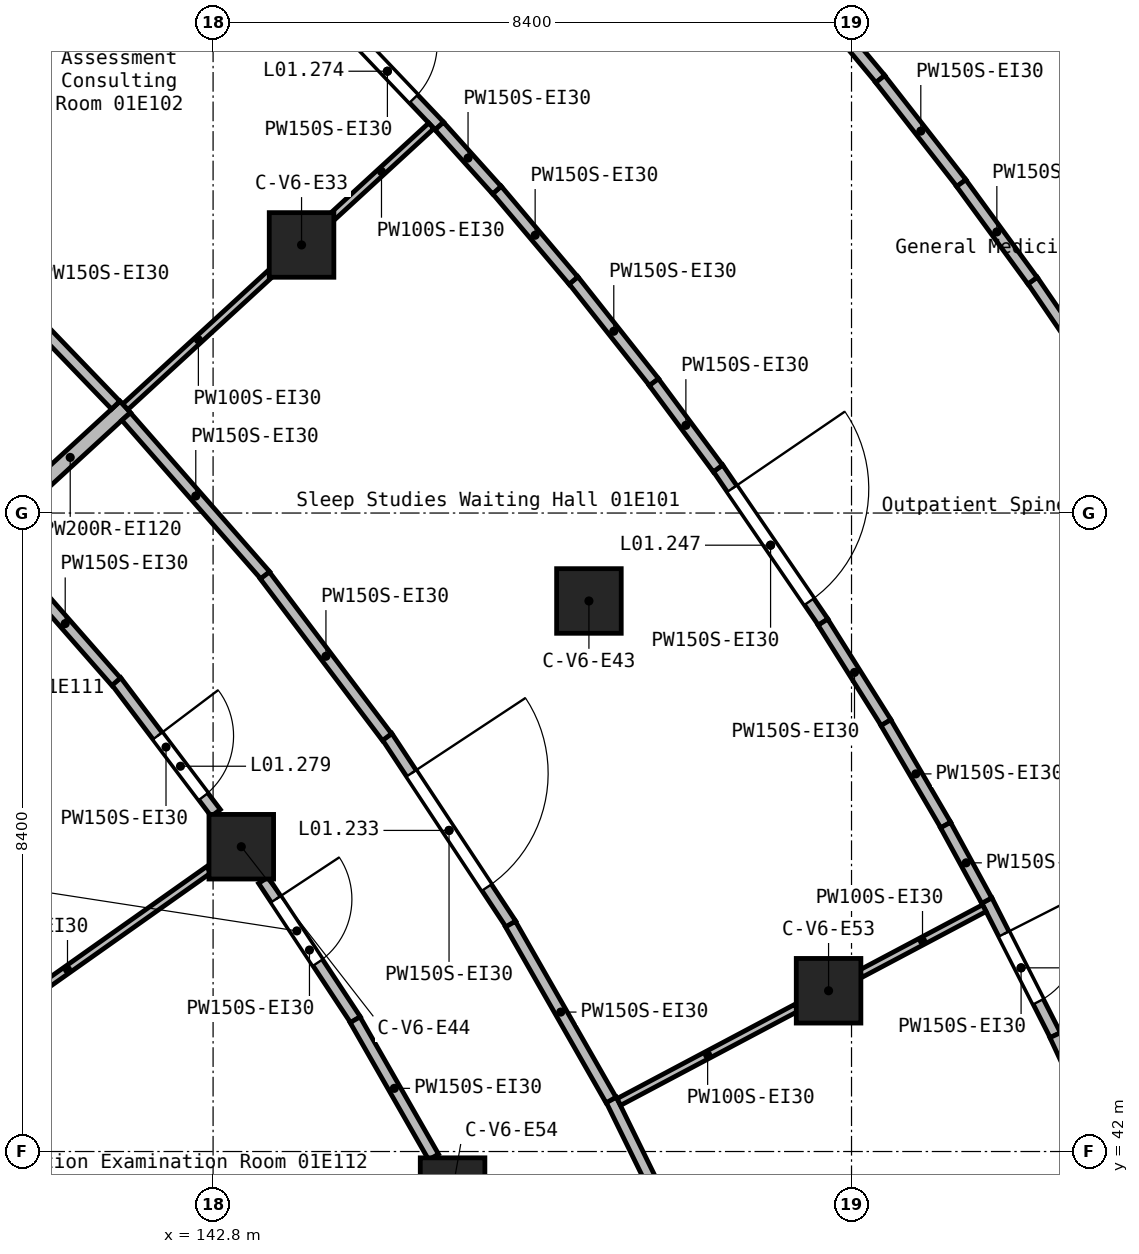
"""IFC4 building model, lengths in metres.
Left out: names, types, materials, properties, quantities, classifications, styles, units other than length and angle.
Written with IfcOpenShell. Run it as: python <this file> out.ifc"""

import sys

from ifc_helpers import new_model, si_unit, direction, frame, frame_2d, origin, origin_2d, place, context, subcontext, project, spatial, rectangle, extrude, element, fill, save


model = new_model("IFC4")
c1 = context("Model", 3, precision=1e-05, world=origin(), true_north=direction((0.0, 1.0)))
c2 = subcontext(c1, "Body", "Model", "MODEL_VIEW")
j1 = project(units=[si_unit("LENGTHUNIT", "METRE"), si_unit("PLANEANGLEUNIT", "RADIAN")], contexts=[c1])
p1 = place(None, origin())
s1 = spatial("IfcSite", under=j1, at=p1, CompositionType="ELEMENT")
p2 = place(p1, origin())
s2 = spatial("IfcBuilding", under=s1, at=p2, CompositionType="ELEMENT")
p3 = place(p2, frame((0.0, 0.0, 5.4)))
s3 = spatial("IfcBuildingStorey", under=s2, at=p3, CompositionType="ELEMENT", Elevation=5.4)
for number, where, z_axis, x_axis in (
    (1, (143.171, 46.01, 0.0), (0.0, 0.0, 1.0), (1.0, 0.0, 0.0)),
    (2, (143.964, 53.927, 0.0), (0.0, 0.0, 1.0), (1.0, 0.0, 0.0)),
    (3, (145.951, 41.492, 0.0), (0.0, 0.0, 1.0), (1.0, 0.0, 0.0)),
    (4, (147.745, 49.243, 0.0), (0.0, 0.0, 1.0), (1.0, 0.0, 0.0)),
    (5, (150.898, 44.115, 0.0), (0.0, 0.0, 1.0), (1.0, 0.0, 0.0)),
):
    element("IfcColumn", number, at=place(p3, frame(where, z_axis=z_axis, x_axis=x_axis)), inside=s3, PredefinedType="COLUMN", context=c2, shape_type="SweptSolid", body=[
        extrude(rectangle(XDim=0.85, YDim=0.85, at=origin_2d()), origin(), (0.0, 0.0, 1.0), 4.5),
    ])
p4 = place(p3, frame((140.196, 50.467, 0.0), z_axis=(0.0, 0.0, 1.0), x_axis=(0.736519787736, 0.676415997943, 0.0)))
e6 = element("IfcWall", 6, at=p4, inside=s3, PredefinedType="SOLIDWALL", context=c2, shape_type="SweptSolid", body=[
    extrude(rectangle(XDim=1.966, YDim=0.2, at=frame_2d((0.983, 0.0))), origin(), (0.0, 0.0, 1.0), 4.15),
])
p5 = place(p3, frame((148.038, 42.683, 0.0), z_axis=(0.0, 0.0, 1.0), x_axis=(0.440200278942, -0.897899612663, 0.0)))
e7 = element("IfcWall", 7, at=p5, inside=s3, PredefinedType="PARTITIONING", context=c2, shape_type="SweptSolid", body=[
    extrude(rectangle(XDim=2.958, YDim=0.15, at=frame_2d((1.479, 0.0))), origin(), (0.0, 0.0, 1.0), 4.15),
])
p6 = place(p3, frame((145.09, 47.458, 0.0), z_axis=(0.0, 0.0, 1.0), x_axis=(0.551018151494, -0.834493257447, 0.0)))
e8 = element("IfcWall", 8, at=p6, inside=s3, PredefinedType="PARTITIONING", context=c2, shape_type="SweptSolid", body=[
    extrude(rectangle(XDim=2.958, YDim=0.15, at=frame_2d((1.479, 0.0))), origin(), (0.0, 0.0, 1.0), 4.15),
])
p7 = place(p6, frame((0.579, 0.0, 0.0)))
e9 = element("IfcOpeningElement", 9, at=p7, cuts=e8, PredefinedType="OPENING", context=c2, shape_type="SweptSolid", body=[
    extrude(rectangle(XDim=1.8, YDim=2.1, at=frame_2d((0.9, 1.05))), frame((0.0, 0.085, 0.0), z_axis=(0.0, -1.0, 0.0), x_axis=(1.0, 0.0, 0.0)), (0.0, 0.0, 1.0), 0.17),
])
p8 = place(p3, frame((146.713, 44.992, 0.0), z_axis=(0.0, 0.0, 1.0), x_axis=(0.49622768999, -0.868192420888, 0.0)))
e10 = element("IfcWall", 10, at=p8, inside=s3, PredefinedType="PARTITIONING", context=c2, shape_type="SweptSolid", body=[
    extrude(rectangle(XDim=2.666, YDim=0.15, at=frame_2d((1.333, 0.0))), origin(), (0.0, 0.0, 1.0), 4.15),
])
p9 = place(p3, frame((141.656, 51.669, 0.0), z_axis=(0.0, 0.0, 1.0), x_axis=(0.659076402407, -0.752075990702, 0.0)))
e11 = element("IfcWall", 11, at=p9, inside=s3, PredefinedType="PARTITIONING", context=c2, shape_type="SweptSolid", body=[
    extrude(rectangle(XDim=2.78, YDim=0.15, at=frame_2d((1.39, 0.0))), origin(), (0.0, 0.0, 1.0), 4.15),
])
p10 = place(p3, frame((143.481, 49.579, 0.0), z_axis=(0.0, 0.0, 1.0), x_axis=(0.602824021104, -0.797874175281, 0.0)))
e12 = element("IfcWall", 12, at=p10, inside=s3, PredefinedType="PARTITIONING", context=c2, shape_type="SweptSolid", body=[
    extrude(rectangle(XDim=2.666, YDim=0.15, at=frame_2d((1.333, 0.0))), origin(), (0.0, 0.0, 1.0), 4.15),
])
p11 = place(p3, frame((139.691, 53.718, 0.0), z_axis=(0.0, 0.0, 1.0), x_axis=(0.693447550136, -0.720507109757, 0.0)))
e13 = element("IfcWall", 13, at=p11, inside=s3, PredefinedType="PARTITIONING", context=c2, shape_type="SweptSolid", body=[
    extrude(rectangle(XDim=2.635, YDim=0.15, at=frame_2d((1.317, 0.0))), origin(), (0.0, 0.0, 1.0), 4.15),
])
p12 = place(p3, frame((141.526, 48.188, 0.0), z_axis=(0.0, 0.0, 1.0), x_axis=(0.60280129331, -0.797891346477, 0.0)))
e14 = element("IfcWall", 14, at=p12, inside=s3, PredefinedType="PARTITIONING", context=c2, shape_type="SweptSolid", body=[
    extrude(rectangle(XDim=2.172, YDim=0.15, at=frame_2d((1.086, 0.0))), origin(), (0.0, 0.0, 1.0), 4.15),
])
p13 = place(p12, frame((0.902, 0.0, 0.0)))
e15 = element("IfcOpeningElement", 15, at=p13, cuts=e14, PredefinedType="OPENING", context=c2, shape_type="SweptSolid", body=[
    extrude(rectangle(XDim=1.0, YDim=2.1, at=frame_2d((0.5, 1.05))), frame((0.0, 0.085, 0.0), z_axis=(0.0, -1.0, 0.0), x_axis=(1.0, 0.0, 0.0)), (0.0, 0.0, 1.0), 0.17),
])
p14 = place(p3, frame((143.462, 45.57, 0.0), z_axis=(0.0, 0.0, 1.0), x_axis=(0.550880835548, -0.834583911315, 0.0)))
e16 = element("IfcWall", 16, at=p14, inside=s3, PredefinedType="PARTITIONING", context=c2, shape_type="SweptSolid", body=[
    extrude(rectangle(XDim=2.201, YDim=0.15, at=frame_2d((1.101, 0.0))), origin(), (0.0, 0.0, 1.0), 4.15),
])
p15 = place(p14, frame((0.299, 0.0, 0.0)))
e17 = element("IfcOpeningElement", 17, at=p15, cuts=e16, PredefinedType="OPENING", context=c2, shape_type="SweptSolid", body=[
    extrude(rectangle(XDim=1.0, YDim=2.1, at=frame_2d((0.5, 1.05))), frame((0.0, 0.085, 0.0), z_axis=(0.0, -1.0, 0.0), x_axis=(1.0, 0.0, 0.0)), (0.0, 0.0, 1.0), 0.17),
])
p16 = place(p3, frame((144.668, 43.734, 0.0), z_axis=(0.0, 0.0, 1.0), x_axis=(0.496694973164, -0.867925171679, 0.0)))
e18 = element("IfcWall", 18, at=p16, inside=s3, PredefinedType="PARTITIONING", context=c2, shape_type="SweptSolid", body=[
    extrude(rectangle(XDim=2.08, YDim=0.15, at=frame_2d((1.04, 0.0))), origin(), (0.0, 0.0, 1.0), 4.15),
])
p17 = place(p3, frame((140.184, 49.71, 0.0), z_axis=(0.0, 0.0, 1.0), x_axis=(0.659209376091, -0.751959439381, 0.0)))
e19 = element("IfcWall", 19, at=p17, inside=s3, PredefinedType="PARTITIONING", context=c2, shape_type="SweptSolid", body=[
    extrude(rectangle(XDim=2.035, YDim=0.15, at=frame_2d((1.017, 0.0))), origin(), (0.0, 0.0, 1.0), 4.15),
])
p18 = place(p3, frame((149.443, 50.99, 0.0), z_axis=(0.0, 0.0, 1.0), x_axis=(0.564305795339, -0.825565847977, 0.0)))
e20 = element("IfcWall", 20, at=p18, inside=s3, PredefinedType="PARTITIONING", context=c2, shape_type="SweptSolid", body=[
    extrude(rectangle(XDim=2.454, YDim=0.15, at=frame_2d((1.227, 0.0))), origin(), (0.0, 0.0, 1.0), 4.15),
])
p19 = place(p18, frame((0.327, 0.0, 0.0)))
e21 = element("IfcOpeningElement", 21, at=p19, cuts=e20, PredefinedType="OPENING", context=c2, shape_type="SweptSolid", body=[
    extrude(rectangle(XDim=1.8, YDim=2.1, at=frame_2d((0.9, 1.05))), frame((0.0, 0.085, 0.0), z_axis=(0.0, -1.0, 0.0), x_axis=(1.0, 0.0, 0.0)), (0.0, 0.0, 1.0), 0.17),
])
p20 = place(p3, frame((152.98, 45.304, 0.0), z_axis=(0.0, 0.0, 1.0), x_axis=(0.45308978769, -0.89146488674, 0.0)))
e22 = element("IfcWall", 22, at=p20, inside=s3, PredefinedType="PARTITIONING", context=c2, shape_type="SweptSolid", body=[
    extrude(rectangle(XDim=1.991, YDim=0.15, at=frame_2d((0.996, 0.0))), origin(), (0.0, 0.0, 1.0), 4.15),
])
p21 = place(p20, frame((0.495, 0.0, 0.0)))
e23 = element("IfcOpeningElement", 23, at=p21, cuts=e22, PredefinedType="OPENING", context=c2, shape_type="SweptSolid", body=[
    extrude(rectangle(XDim=1.0, YDim=2.1, at=frame_2d((0.5, 1.05))), frame((0.0, 0.085, 0.0), z_axis=(0.0, -1.0, 0.0), x_axis=(1.0, 0.0, 0.0)), (0.0, 0.0, 1.0), 0.17),
])
p22 = place(p3, frame((144.408, 56.933, 0.0), z_axis=(0.0, 0.0, 1.0), x_axis=(0.689023586461, -0.724738916646, 0.0)))
e24 = element("IfcWall", 24, at=p22, inside=s3, PredefinedType="PARTITIONING", context=c2, shape_type="SweptSolid", body=[
    extrude(rectangle(XDim=1.989, YDim=0.15, at=frame_2d((0.995, 0.0))), origin(), (0.0, 0.0, 1.0), 4.15),
])
p23 = place(p22, frame((0.494, 0.0, 0.0)))
e25 = element("IfcOpeningElement", 25, at=p23, cuts=e24, PredefinedType="OPENING", context=c2, shape_type="SweptSolid", body=[
    extrude(rectangle(XDim=1.0, YDim=2.1, at=frame_2d((0.5, 1.05))), frame((0.0, 0.085, 0.0), z_axis=(0.0, -1.0, 0.0), x_axis=(1.0, 0.0, 0.0)), (0.0, 0.0, 1.0), 0.17),
])
p24 = place(p3, frame((150.372, 57.558, 0.0), z_axis=(0.0, 0.0, 1.0), x_axis=(0.640540861144, -0.767924088178, 0.0)))
e26 = element("IfcWall", 26, at=p24, inside=s3, PredefinedType="PARTITIONING", context=c2, shape_type="SweptSolid", body=[
    extrude(rectangle(XDim=1.886, YDim=0.15, at=frame_2d((0.943, 0.0))), origin(), (0.0, 0.0, 1.0), 4.15),
])
p25 = place(p3, frame((151.577, 56.11, 0.0), z_axis=(0.0, 0.0, 1.0), x_axis=(0.615485903982, -0.788147893481, 0.0)))
e27 = element("IfcWall", 27, at=p25, inside=s3, PredefinedType="PARTITIONING", context=c2, shape_type="SweptSolid", body=[
    extrude(rectangle(XDim=1.738, YDim=0.15, at=frame_2d((0.869, 0.0))), origin(), (0.0, 0.0, 1.0), 4.15),
])
p26 = place(p3, frame((153.582, 53.46, 0.0), z_axis=(0.0, 0.0, 1.0), x_axis=(0.564047793024, -0.825742143277, 0.0)))
e28 = element("IfcWall", 28, at=p26, inside=s3, PredefinedType="PARTITIONING", context=c2, shape_type="SweptSolid", body=[
    extrude(rectangle(XDim=1.885, YDim=0.15, at=frame_2d((0.943, 0.0))), origin(), (0.0, 0.0, 1.0), 4.15),
])
p27 = place(p3, frame((152.643, 54.74, 0.0), z_axis=(0.0, 0.0, 1.0), x_axis=(0.590151339463, -0.807292633764, 0.0)))
e29 = element("IfcWall", 29, at=p27, inside=s3, PredefinedType="PARTITIONING", context=c2, shape_type="SweptSolid", body=[
    extrude(rectangle(XDim=1.59, YDim=0.15, at=frame_2d((0.795, 0.0))), origin(), (0.0, 0.0, 1.0), 4.15),
])
p28 = place(p3, frame((150.823, 48.965, 0.0), z_axis=(0.0, 0.0, 1.0), x_axis=(0.531963557529, -0.846767248694, 0.0)))
e30 = element("IfcWall", 30, at=p28, inside=s3, PredefinedType="PARTITIONING", context=c2, shape_type="SweptSolid", body=[
    extrude(rectangle(XDim=1.563, YDim=0.15, at=frame_2d((0.781, 0.0))), origin(), (0.0, 0.0, 1.0), 4.15),
])
p29 = place(p3, frame((147.542, 53.462, 0.0), z_axis=(0.0, 0.0, 1.0), x_axis=(0.620542012859, -0.784173201708, 0.0)))
e31 = element("IfcWall", 31, at=p29, inside=s3, PredefinedType="PARTITIONING", context=c2, shape_type="SweptSolid", body=[
    extrude(rectangle(XDim=1.71, YDim=0.15, at=frame_2d((0.855, 0.0))), origin(), (0.0, 0.0, 1.0), 4.15),
])
p30 = place(p3, frame((151.652, 47.642, 0.0), z_axis=(0.0, 0.0, 1.0), x_axis=(0.504852542481, -0.863205601436, 0.0)))
e32 = element("IfcWall", 32, at=p30, inside=s3, PredefinedType="PARTITIONING", context=c2, shape_type="SweptSolid", body=[
    extrude(rectangle(XDim=1.562, YDim=0.15, at=frame_2d((0.781, 0.0))), origin(), (0.0, 0.0, 1.0), 4.15),
])
p31 = place(p3, frame((153.878, 43.53, 0.0), z_axis=(0.0, 0.0, 1.0), x_axis=(0.421455751704, -0.906848967224, 0.0)))
e33 = element("IfcWall", 33, at=p31, inside=s3, PredefinedType="PARTITIONING", context=c2, shape_type="SweptSolid", body=[
    extrude(rectangle(XDim=1.562, YDim=0.15, at=frame_2d((0.781, 0.0))), origin(), (0.0, 0.0, 1.0), 4.15),
])
p32 = place(p3, frame((148.599, 52.122, 0.0), z_axis=(0.0, 0.0, 1.0), x_axis=(0.595875663086, -0.803076705017, 0.0)))
e34 = element("IfcWall", 34, at=p32, inside=s3, PredefinedType="PARTITIONING", context=c2, shape_type="SweptSolid", body=[
    extrude(rectangle(XDim=1.414, YDim=0.15, at=frame_2d((0.707, 0.0))), origin(), (0.0, 0.0, 1.0), 4.15),
])
p33 = place(p3, frame((146.534, 54.651, 0.0), z_axis=(0.0, 0.0, 1.0), x_axis=(0.645184874707, -0.764026490018, 0.0)))
e35 = element("IfcWall", 35, at=p33, inside=s3, PredefinedType="PARTITIONING", context=c2, shape_type="SweptSolid", body=[
    extrude(rectangle(XDim=1.561, YDim=0.15, at=frame_2d((0.781, 0.0))), origin(), (0.0, 0.0, 1.0), 4.15),
])
p34 = place(p3, frame((145.776, 55.492, 0.0), z_axis=(0.0, 0.0, 1.0), x_axis=(0.668310227337, -0.743882678946, 0.0)))
e36 = element("IfcWall", 36, at=p34, inside=s3, PredefinedType="PARTITIONING", context=c2, shape_type="SweptSolid", body=[
    extrude(rectangle(XDim=1.134, YDim=0.15, at=frame_2d((0.567, 0.0))), origin(), (0.0, 0.0, 1.0), 4.15),
])
p35 = place(p3, frame((152.437, 46.295, 0.0), z_axis=(0.0, 0.0, 1.0), x_axis=(0.478761469216, -0.877945018549, 0.0)))
e37 = element("IfcWall", 37, at=p35, inside=s3, PredefinedType="PARTITIONING", context=c2, shape_type="SweptSolid", body=[
    extrude(rectangle(XDim=1.132, YDim=0.15, at=frame_2d((0.566, 0.0))), origin(), (0.0, 0.0, 1.0), 4.15),
])
p36 = place(p3, frame((139.026, 43.081, 0.0), z_axis=(0.0, 0.0, 1.0), x_axis=(0.816637661001, 0.577150700108, 0.0)))
e38 = element("IfcWall", 38, at=p36, inside=s3, PredefinedType="PARTITIONING", context=c2, shape_type="SweptSolid", body=[
    extrude(rectangle(XDim=4.551, YDim=0.1, at=frame_2d((2.275, 0.0))), origin(), (0.0, 0.0, 1.0), 4.15),
])
p37 = place(p3, frame((141.645, 51.798, 0.0), z_axis=(0.0, 0.0, 1.0), x_axis=(0.73658314114, 0.676347008709, 0.0)))
e39 = element("IfcWall", 39, at=p37, inside=s3, PredefinedType="PARTITIONING", context=c2, shape_type="SweptSolid", body=[
    extrude(rectangle(XDim=2.61, YDim=0.1, at=frame_2d((1.305, 0.0))), origin(), (0.0, 0.0, 1.0), 4.15),
])
p38 = place(p3, frame((144.36, 54.291, 0.0), z_axis=(0.0, 0.0, 1.0), x_axis=(0.736578706187, 0.676351838611, 0.0)))
e40 = element("IfcWall", 40, at=p38, inside=s3, PredefinedType="PARTITIONING", context=c2, shape_type="SweptSolid", body=[
    extrude(rectangle(XDim=1.78, YDim=0.1, at=frame_2d((0.89, 0.0))), origin(), (0.0, 0.0, 1.0), 4.15),
])
p39 = place(p3, frame((148.139, 42.652, 0.0), z_axis=(0.0, 0.0, 1.0), x_axis=(0.883500310686, 0.468430572249, 0.0)))
e41 = element("IfcWall", 41, at=p39, inside=s3, PredefinedType="PARTITIONING", context=c2, shape_type="SweptSolid", body=[
    extrude(rectangle(XDim=2.645, YDim=0.1, at=frame_2d((1.322, 0.0))), origin(), (0.0, 0.0, 1.0), 4.15),
])
p40 = place(p3, frame((151.321, 44.339, 0.0), z_axis=(0.0, 0.0, 1.0), x_axis=(0.883507022745, 0.46841791251, 0.0)))
e42 = element("IfcWall", 42, at=p40, inside=s3, PredefinedType="PARTITIONING", context=c2, shape_type="SweptSolid", body=[
    extrude(rectangle(XDim=1.84, YDim=0.1, at=frame_2d((0.92, 0.0))), origin(), (0.0, 0.0, 1.0), 4.15),
])
p41 = place(p7, frame((1.8, 0.0, 0.0), z_axis=(0.0, 0.0, 1.0), x_axis=(-1.0, 0.0, 0.0)))
e43 = element("IfcDoor", 43, at=p41, inside=s3, OperationType="DOUBLE_DOOR_SINGLE_SWING", PredefinedType="DOOR", context=c2, shape_type="SweptSolid", body=[
    extrude(rectangle(XDim=1.8, YDim=2.1, at=frame_2d((0.9, 1.05))), frame((0.0, 0.025, 0.0), z_axis=(0.0, -1.0, 0.0), x_axis=(1.0, 0.0, 0.0)), (0.0, 0.0, 1.0), 0.05),
])
fill(e9, e43)
p42 = place(p19, origin())
e44 = element("IfcDoor", 44, at=p42, inside=s3, OperationType="DOUBLE_DOOR_SINGLE_SWING", PredefinedType="DOOR", context=c2, shape_type="SweptSolid", body=[
    extrude(rectangle(XDim=1.8, YDim=2.1, at=frame_2d((0.9, 1.05))), frame((0.0, 0.025, 0.0), z_axis=(0.0, -1.0, 0.0), x_axis=(1.0, 0.0, 0.0)), (0.0, 0.0, 1.0), 0.05),
])
fill(e21, e44)
p43 = place(p23, frame((1.0, 0.0, 0.0), z_axis=(0.0, 0.0, 1.0), x_axis=(-1.0, 0.0, 0.0)))
e45 = element("IfcDoor", 45, at=p43, inside=s3, OperationType="SINGLE_SWING_LEFT", PredefinedType="DOOR", context=c2, shape_type="SweptSolid", body=[
    extrude(rectangle(XDim=1.0, YDim=2.1, at=frame_2d((0.5, 1.05))), frame((0.0, 0.025, 0.0), z_axis=(0.0, -1.0, 0.0), x_axis=(1.0, 0.0, 0.0)), (0.0, 0.0, 1.0), 0.05),
])
fill(e25, e45)
p44 = place(p21, frame((1.0, 0.0, 0.0), z_axis=(0.0, 0.0, 1.0), x_axis=(-1.0, 0.0, 0.0)))
e46 = element("IfcDoor", 46, at=p44, inside=s3, OperationType="SINGLE_SWING_RIGHT", PredefinedType="DOOR", context=c2, shape_type="SweptSolid", body=[
    extrude(rectangle(XDim=1.0, YDim=2.1, at=frame_2d((0.5, 1.05))), frame((0.0, 0.025, 0.0), z_axis=(0.0, -1.0, 0.0), x_axis=(1.0, 0.0, 0.0)), (0.0, 0.0, 1.0), 0.05),
])
fill(e23, e46)
p45 = place(p13, frame((1.0, 0.0, 0.0), z_axis=(0.0, 0.0, 1.0), x_axis=(-1.0, 0.0, 0.0)))
e47 = element("IfcDoor", 47, at=p45, inside=s3, OperationType="SINGLE_SWING_LEFT", PredefinedType="DOOR", context=c2, shape_type="SweptSolid", body=[
    extrude(rectangle(XDim=1.0, YDim=2.1, at=frame_2d((0.5, 1.05))), frame((0.0, 0.025, 0.0), z_axis=(0.0, -1.0, 0.0), x_axis=(1.0, 0.0, 0.0)), (0.0, 0.0, 1.0), 0.05),
])
fill(e15, e47)
p46 = place(p15, frame((1.0, 0.0, 0.0), z_axis=(0.0, 0.0, 1.0), x_axis=(-1.0, 0.0, 0.0)))
e48 = element("IfcDoor", 48, at=p46, inside=s3, OperationType="SINGLE_SWING_RIGHT", PredefinedType="DOOR", context=c2, shape_type="SweptSolid", body=[
    extrude(rectangle(XDim=1.0, YDim=2.1, at=frame_2d((0.5, 1.05))), frame((0.0, 0.025, 0.0), z_axis=(0.0, -1.0, 0.0), x_axis=(1.0, 0.0, 0.0)), (0.0, 0.0, 1.0), 0.05),
])
fill(e17, e48)
save(model, sys.argv[1])
